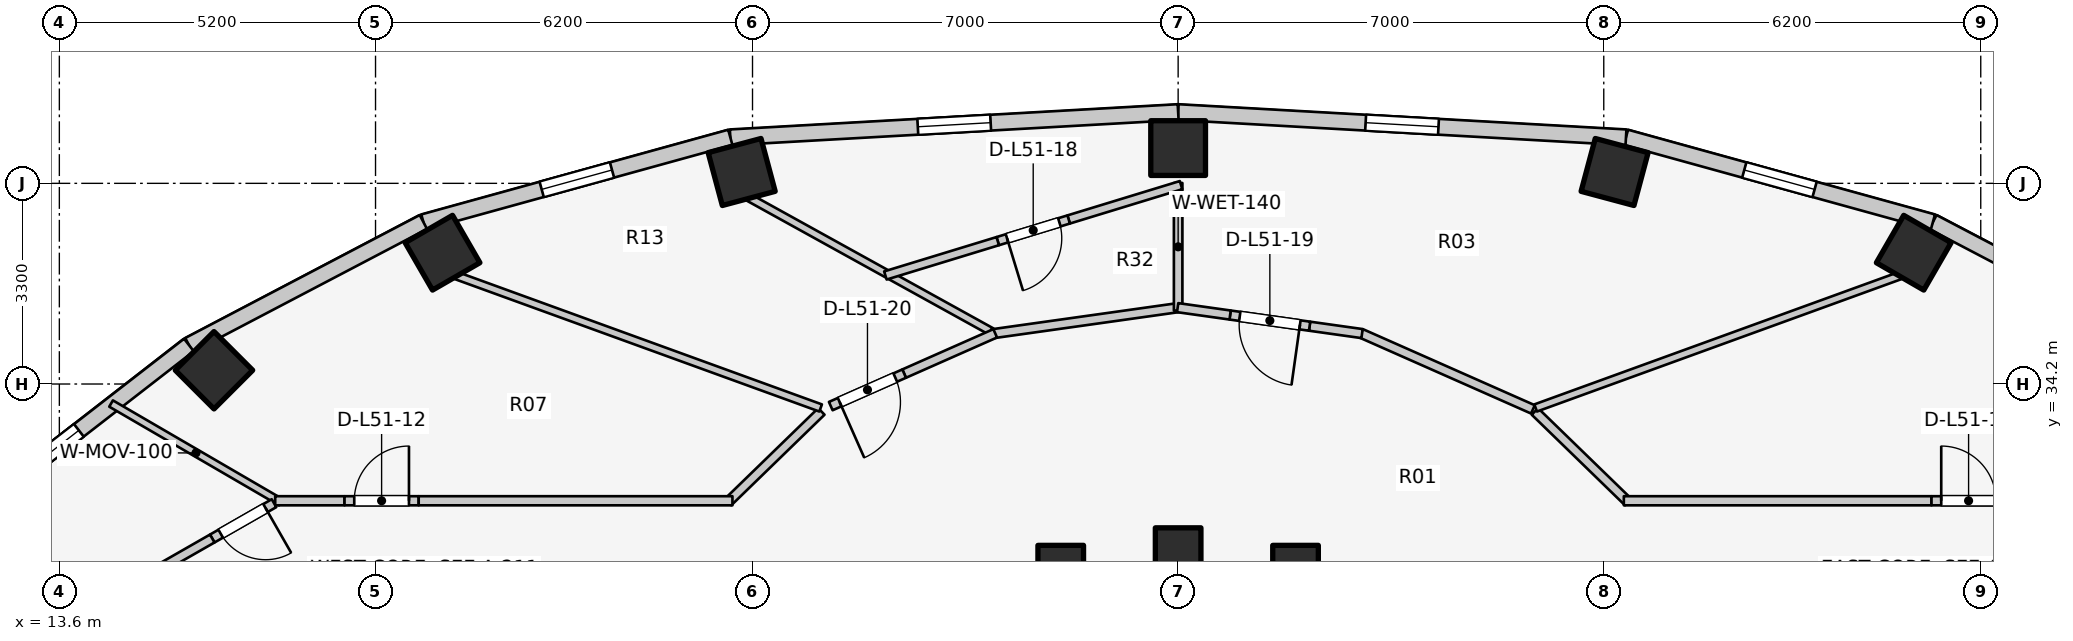
"""IFC4 building model, lengths in metres.
Left out: names, types, materials, properties, quantities, classifications, styles, units other than length and angle.
Written with IfcOpenShell. Run it as: python <this file> out.ifc"""

import sys

from ifc_helpers import new_model, si_unit, direction, frame, frame_2d, origin, origin_2d, place, context, subcontext, project, spatial, rectangle, extrude, element, fill, save


model = new_model("IFC4")
c1 = context("Model", 3, precision=1e-05, world=origin(), true_north=direction((0.0, 1.0)))
c2 = subcontext(c1, "Body", "Model", "MODEL_VIEW")
j1 = project(units=[si_unit("LENGTHUNIT", "METRE"), si_unit("PLANEANGLEUNIT", "RADIAN")], contexts=[c1])
p1 = place(None, origin())
s1 = spatial("IfcSite", under=j1, at=p1, CompositionType="ELEMENT")
p2 = place(p1, origin())
s2 = spatial("IfcBuilding", under=s1, at=p2, CompositionType="ELEMENT")
p3 = place(p2, frame((0.0, 0.0, 168.4)))
s3 = spatial("IfcBuildingStorey", under=s2, at=p3, CompositionType="ELEMENT", Elevation=168.4)
p4 = place(p3, frame((44.098, 36.359, 0.0), z_axis=(0.0, 0.0, 1.0), x_axis=(0.5, 0.866025403784, 0.0)))
e1 = element("IfcColumn", 1, at=p4, inside=s3, PredefinedType="COLUMN", context=c2, shape_type="SweptSolid", body=[
    extrude(rectangle(XDim=0.9, YDim=0.9, at=origin_2d()), origin(), (0.0, 0.0, 1.0), 3.1),
])
p5 = place(p3, frame((33.931, 31.172, 0.0), z_axis=(0.0, 0.0, 1.0), x_axis=(1.0, 0.0, 0.0)))
e2 = element("IfcColumn", 2, at=p5, inside=s3, PredefinedType="COLUMN", context=c2, shape_type="SweptSolid", body=[
    extrude(rectangle(XDim=0.75, YDim=0.75, at=origin_2d()), origin(), (0.0, 0.0, 1.0), 3.1),
])
p6 = place(p3, frame((39.178, 37.687, 0.0), z_axis=(0.0, 0.0, 1.0), x_axis=(0.258819045103, 0.965925826289, 0.0)))
e3 = element("IfcColumn", 3, at=p6, inside=s3, PredefinedType="COLUMN", context=c2, shape_type="SweptSolid", body=[
    extrude(rectangle(XDim=0.9, YDim=0.9, at=origin_2d()), origin(), (0.0, 0.0, 1.0), 3.1),
])
p7 = place(p3, frame((32.0, 31.46, 0.0), z_axis=(0.0, 0.0, 1.0), x_axis=(1.0, 0.0, 0.0)))
e4 = element("IfcColumn", 4, at=p7, inside=s3, PredefinedType="COLUMN", context=c2, shape_type="SweptSolid", body=[
    extrude(rectangle(XDim=0.75, YDim=0.75, at=origin_2d()), origin(), (0.0, 0.0, 1.0), 3.1),
])
p8 = place(p3, frame((32.0, 38.08, 0.0), z_axis=(0.0, 0.0, 1.0), x_axis=(0.0, 1.0, 0.0)))
e5 = element("IfcColumn", 5, at=p8, inside=s3, PredefinedType="COLUMN", context=c2, shape_type="SweptSolid", body=[
    extrude(rectangle(XDim=0.9, YDim=0.9, at=origin_2d()), origin(), (0.0, 0.0, 1.0), 3.1),
])
p9 = place(p3, frame((30.069, 31.172, 0.0), z_axis=(0.0, 0.0, 1.0), x_axis=(1.0, 0.0, 0.0)))
e6 = element("IfcColumn", 6, at=p9, inside=s3, PredefinedType="COLUMN", context=c2, shape_type="SweptSolid", body=[
    extrude(rectangle(XDim=0.75, YDim=0.75, at=origin_2d()), origin(), (0.0, 0.0, 1.0), 3.1),
])
for number, where, z_axis, x_axis in (
    (7, (24.822, 37.687, 0.0), (0.0, 0.0, 1.0), (-0.259, 0.966, 0.0)),
    (8, (19.902, 36.359, 0.0), (0.0, 0.0, 1.0), (-0.5, 0.866, 0.0)),
    (9, (16.143, 34.427, 0.0), (0.0, 0.0, 1.0), (-0.707, 0.707, 0.0)),
):
    element("IfcColumn", number, at=place(p3, frame(where, z_axis=z_axis, x_axis=x_axis)), inside=s3, PredefinedType="COLUMN", context=c2, shape_type="SweptSolid", body=[
        extrude(rectangle(XDim=0.9, YDim=0.9, at=origin_2d()), origin(), (0.0, 0.0, 1.0), 3.1),
    ])
p10 = place(p3, frame((48.269, 34.842, 0.0), z_axis=(0.0, 0.0, 1.0), x_axis=(-0.885660265226, 0.464333818065, 0.0)))
e10 = element("IfcWall", 10, at=p10, inside=s3, PredefinedType="STANDARD", context=c2, shape_type="SweptSolid", body=[
    extrude(rectangle(XDim=4.354, YDim=0.26, at=frame_2d((2.177, 0.0))), origin(), (0.0, 0.0, 1.0), 1.22),
])
p11 = place(p3, frame((44.413, 36.863, 0.0), z_axis=(0.0, 0.0, 1.0), x_axis=(-0.963953455704, 0.26607092144, 0.0)))
e11 = element("IfcWall", 11, at=p11, inside=s3, PredefinedType="STANDARD", context=c2, shape_type="SweptSolid", body=[
    extrude(rectangle(XDim=5.237, YDim=0.26, at=frame_2d((2.618, 0.0))), origin(), (0.0, 0.0, 1.0), 1.22),
])
p12 = place(p11, frame((2.018, 0.0, 0.15)))
e12 = element("IfcOpeningElement", 12, at=p12, cuts=e11, PredefinedType="OPENING", context=c2, shape_type="SweptSolid", body=[
    extrude(rectangle(XDim=1.2, YDim=0.9, at=frame_2d((0.6, 0.45))), frame((0.0, 0.14, 0.0), z_axis=(0.0, -1.0, 0.0), x_axis=(1.0, 0.0, 0.0)), (0.0, 0.0, 1.0), 0.28),
])
p13 = place(p3, frame((39.365, 38.257, 0.0), z_axis=(0.0, 0.0, 1.0), x_axis=(-0.998417906562, 0.056228852534, 0.0)))
e13 = element("IfcWall", 13, at=p13, inside=s3, PredefinedType="STANDARD", context=c2, shape_type="SweptSolid", body=[
    extrude(rectangle(XDim=7.377, YDim=0.26, at=frame_2d((3.688, 0.0))), origin(), (0.0, 0.0, 1.0), 1.22),
])
p14 = place(p13, frame((3.088, 0.0, 0.15)))
e14 = element("IfcOpeningElement", 14, at=p14, cuts=e13, PredefinedType="OPENING", context=c2, shape_type="SweptSolid", body=[
    extrude(rectangle(XDim=1.2, YDim=0.9, at=frame_2d((0.6, 0.45))), frame((0.0, 0.14, 0.0), z_axis=(0.0, -1.0, 0.0), x_axis=(1.0, 0.0, 0.0)), (0.0, 0.0, 1.0), 0.28),
])
p15 = place(p3, frame((32.0, 38.671, 0.0), z_axis=(0.0, 0.0, 1.0), x_axis=(-0.998417906562, -0.056228852534, 0.0)))
e15 = element("IfcWall", 15, at=p15, inside=s3, PredefinedType="STANDARD", context=c2, shape_type="SweptSolid", body=[
    extrude(rectangle(XDim=7.377, YDim=0.26, at=frame_2d((3.688, 0.0))), origin(), (0.0, 0.0, 1.0), 1.22),
])
p16 = place(p15, frame((3.088, 0.0, 0.15)))
e16 = element("IfcOpeningElement", 16, at=p16, cuts=e15, PredefinedType="OPENING", context=c2, shape_type="SweptSolid", body=[
    extrude(rectangle(XDim=1.2, YDim=0.9, at=frame_2d((0.6, 0.45))), frame((0.0, 0.14, 0.0), z_axis=(0.0, -1.0, 0.0), x_axis=(1.0, 0.0, 0.0)), (0.0, 0.0, 1.0), 0.28),
])
p17 = place(p3, frame((24.635, 38.257, 0.0), z_axis=(0.0, 0.0, 1.0), x_axis=(-0.963953455704, -0.26607092144, 0.0)))
e17 = element("IfcWall", 17, at=p17, inside=s3, PredefinedType="STANDARD", context=c2, shape_type="SweptSolid", body=[
    extrude(rectangle(XDim=5.237, YDim=0.26, at=frame_2d((2.618, 0.0))), origin(), (0.0, 0.0, 1.0), 1.22),
])
p18 = place(p17, frame((2.018, 0.0, 0.15)))
e18 = element("IfcOpeningElement", 18, at=p18, cuts=e17, PredefinedType="OPENING", context=c2, shape_type="SweptSolid", body=[
    extrude(rectangle(XDim=1.2, YDim=0.9, at=frame_2d((0.6, 0.45))), frame((0.0, 0.14, 0.0), z_axis=(0.0, -1.0, 0.0), x_axis=(1.0, 0.0, 0.0)), (0.0, 0.0, 1.0), 0.28),
])
p19 = place(p3, frame((19.587, 36.863, 0.0), z_axis=(0.0, 0.0, 1.0), x_axis=(-0.885660265226, -0.464333818065, 0.0)))
e19 = element("IfcWall", 19, at=p19, inside=s3, PredefinedType="STANDARD", context=c2, shape_type="SweptSolid", body=[
    extrude(rectangle(XDim=4.354, YDim=0.26, at=frame_2d((2.177, 0.0))), origin(), (0.0, 0.0, 1.0), 1.22),
])
p20 = place(p3, frame((15.731, 34.842, 0.0), z_axis=(0.0, 0.0, 1.0), x_axis=(-0.790185650662, -0.612867552973, 0.0)))
e20 = element("IfcWall", 20, at=p20, inside=s3, PredefinedType="STANDARD", context=c2, shape_type="SweptSolid", body=[
    extrude(rectangle(XDim=4.239, YDim=0.26, at=frame_2d((2.12, 0.0))), origin(), (0.0, 0.0, 1.0), 1.22),
])
p21 = place(p20, frame((2.29, 0.0, 0.15)))
e21 = element("IfcOpeningElement", 21, at=p21, cuts=e20, PredefinedType="OPENING", context=c2, shape_type="SweptSolid", body=[
    extrude(rectangle(XDim=1.2, YDim=0.9, at=frame_2d((0.6, 0.45))), frame((0.0, 0.14, 0.0), z_axis=(0.0, -1.0, 0.0), x_axis=(1.0, 0.0, 0.0)), (0.0, 0.0, 1.0), 0.28),
])
p22 = place(p3, frame((37.867, 33.749, 0.0), z_axis=(0.0, 0.0, 1.0), x_axis=(0.717419568599, -0.696641344302, 0.0)))
e22 = element("IfcWall", 22, at=p22, inside=s3, PredefinedType="PARTITIONING", context=c2, shape_type="SweptSolid", body=[
    extrude(rectangle(XDim=2.138, YDim=0.15, at=frame_2d((1.069, 0.0))), origin(), (0.0, 0.0, 1.0), 2.019),
])
p23 = place(p3, frame((39.33, 32.28, 0.0), z_axis=(0.0, 0.0, 1.0), x_axis=(1.0, 0.0, 0.0)))
e23 = element("IfcWall", 23, at=p23, inside=s3, PredefinedType="PARTITIONING", context=c2, shape_type="SweptSolid", body=[
    extrude(rectangle(XDim=5.06, YDim=0.15, at=frame_2d((2.53, 0.0))), origin(), (0.0, 0.0, 1.0), 2.019),
])
p24 = place(p3, frame((44.39, 32.28, 0.0), z_axis=(0.0, 0.0, 1.0), x_axis=(1.0, 0.0, 0.0)))
e24 = element("IfcWall", 24, at=p24, inside=s3, PredefinedType="PARTITIONING", context=c2, shape_type="SweptSolid", body=[
    extrude(rectangle(XDim=1.22, YDim=0.15, at=frame_2d((0.61, 0.0))), origin(), (0.0, 0.0, 1.0), 2.16),
])
p25 = place(p24, frame((0.16, 0.0, 0.0)))
e25 = element("IfcOpeningElement", 25, at=p25, cuts=e24, PredefinedType="OPENING", context=c2, shape_type="SweptSolid", body=[
    extrude(rectangle(XDim=0.9, YDim=2.1, at=frame_2d((0.45, 1.05))), frame((0.0, 0.085, 0.0), z_axis=(0.0, -1.0, 0.0), x_axis=(1.0, 0.0, 0.0)), (0.0, 0.0, 1.0), 0.17),
])
p26 = place(p3, frame((17.243, 32.255, 0.0), z_axis=(0.0, 0.0, 1.0), x_axis=(-0.864408655832, 0.502789892224, 0.0)))
e26 = element("IfcWall", 26, at=p26, inside=s3, PredefinedType="MOVABLE", context=c2, shape_type="SweptSolid", body=[
    extrude(rectangle(XDim=3.23, YDim=0.12, at=frame_2d((1.615, 0.0))), origin(), (0.0, 0.0, 1.0), 1.22),
])
p27 = place(p3, frame((26.133, 33.749, 0.0), z_axis=(0.0, 0.0, 1.0), x_axis=(-0.717419568599, -0.696641344302, 0.0)))
e27 = element("IfcWall", 27, at=p27, inside=s3, PredefinedType="PARTITIONING", context=c2, shape_type="SweptSolid", body=[
    extrude(rectangle(XDim=2.138, YDim=0.15, at=frame_2d((1.069, 0.0))), origin(), (0.0, 0.0, 1.0), 2.019),
])
p28 = place(p3, frame((17.15, 32.28, 0.0), z_axis=(0.0, 0.0, 1.0), x_axis=(1.0, 0.0, 0.0)))
e28 = element("IfcWall", 28, at=p28, inside=s3, PredefinedType="PARTITIONING", context=c2, shape_type="SweptSolid", body=[
    extrude(rectangle(XDim=1.14, YDim=0.15, at=frame_2d((0.57, 0.0))), origin(), (0.0, 0.0, 1.0), 2.575),
])
p29 = place(p3, frame((18.29, 32.28, 0.0), z_axis=(0.0, 0.0, 1.0), x_axis=(1.0, 0.0, 0.0)))
e29 = element("IfcWall", 29, at=p29, inside=s3, PredefinedType="PARTITIONING", context=c2, shape_type="SweptSolid", body=[
    extrude(rectangle(XDim=1.22, YDim=0.15, at=frame_2d((0.61, 0.0))), origin(), (0.0, 0.0, 1.0), 2.575),
])
p30 = place(p29, frame((0.16, 0.0, 0.0)))
e30 = element("IfcOpeningElement", 30, at=p30, cuts=e29, PredefinedType="OPENING", context=c2, shape_type="SweptSolid", body=[
    extrude(rectangle(XDim=0.9, YDim=2.1, at=frame_2d((0.45, 1.05))), frame((0.0, 0.085, 0.0), z_axis=(0.0, -1.0, 0.0), x_axis=(1.0, 0.0, 0.0)), (0.0, 0.0, 1.0), 0.17),
])
p31 = place(p3, frame((19.51, 32.28, 0.0), z_axis=(0.0, 0.0, 1.0), x_axis=(1.0, 0.0, 0.0)))
e31 = element("IfcWall", 31, at=p31, inside=s3, PredefinedType="PARTITIONING", context=c2, shape_type="SweptSolid", body=[
    extrude(rectangle(XDim=5.16, YDim=0.15, at=frame_2d((2.58, 0.0))), origin(), (0.0, 0.0, 1.0), 2.019),
])
p32 = place(p3, frame((17.13, 32.24, 0.0), z_axis=(0.0, 0.0, 1.0), x_axis=(-0.867934757977, -0.496678221684, 0.0)))
e32 = element("IfcWall", 32, at=p32, inside=s3, PredefinedType="PARTITIONING", context=c2, shape_type="SweptSolid", body=[
    extrude(rectangle(XDim=1.17, YDim=0.15, at=frame_2d((0.585, 0.0))), origin(), (0.0, 0.0, 1.0), 2.11),
])
p33 = place(p32, frame((0.16, 0.0, 0.0)))
e33 = element("IfcOpeningElement", 33, at=p33, cuts=e32, PredefinedType="OPENING", context=c2, shape_type="SweptSolid", body=[
    extrude(rectangle(XDim=0.85, YDim=2.05, at=frame_2d((0.425, 1.025))), frame((0.0, 0.085, 0.0), z_axis=(0.0, -1.0, 0.0), x_axis=(1.0, 0.0, 0.0)), (0.0, 0.0, 1.0), 0.17),
])
p34 = place(p3, frame((16.115, 31.659, 0.0), z_axis=(0.0, 0.0, 1.0), x_axis=(-0.868005797727, -0.496554060614, 0.0)))
e34 = element("IfcWall", 34, at=p34, inside=s3, PredefinedType="PARTITIONING", context=c2, shape_type="SweptSolid", body=[
    extrude(rectangle(XDim=1.267, YDim=0.15, at=frame_2d((0.633, 0.0))), origin(), (0.0, 0.0, 1.0), 1.22),
])
p35 = place(p3, frame((37.88, 33.806, 0.0), z_axis=(0.0, 0.0, 1.0), x_axis=(0.939901628116, 0.341445353557, 0.0)))
e35 = element("IfcWall", 35, at=p35, inside=s3, PredefinedType="PARTITIONING", context=c2, shape_type="SweptSolid", body=[
    extrude(rectangle(XDim=6.387, YDim=0.125, at=frame_2d((3.194, 0.0))), origin(), (0.0, 0.0, 1.0), 1.22),
])
p36 = place(p3, frame((28.935, 35.058, 0.0), z_axis=(0.0, 0.0, 1.0), x_axis=(-0.875077338582, 0.48398311076, 0.0)))
e36 = element("IfcWall", 36, at=p36, inside=s3, PredefinedType="PARTITIONING", context=c2, shape_type="SweptSolid", body=[
    extrude(rectangle(XDim=4.573, YDim=0.125, at=frame_2d((2.287, 0.0))), origin(), (0.0, 0.0, 1.0), 1.22),
])
p37 = place(p3, frame((26.12, 33.806, 0.0), z_axis=(0.0, 0.0, 1.0), x_axis=(-0.939901628116, 0.341445353557, 0.0)))
e37 = element("IfcWall", 37, at=p37, inside=s3, PredefinedType="PARTITIONING", context=c2, shape_type="SweptSolid", body=[
    extrude(rectangle(XDim=6.387, YDim=0.125, at=frame_2d((3.194, 0.0))), origin(), (0.0, 0.0, 1.0), 1.22),
])
p38 = place(p3, frame((32.05, 35.463, 0.0), z_axis=(0.0, 0.0, 1.0), x_axis=(-0.990254405439, -0.139270285808, 0.0)))
e38 = element("IfcWall", 38, at=p38, inside=s3, PredefinedType="PARTITIONING", context=c2, shape_type="SweptSolid", body=[
    extrude(rectangle(XDim=3.147, YDim=0.15, at=frame_2d((1.573, 0.0))), origin(), (0.0, 0.0, 1.0), 2.019),
])
p39 = place(p3, frame((32.0, 35.406, 0.0), z_axis=(0.0, 0.0, 1.0), x_axis=(0.0, 1.0, 0.0)))
e39 = element("IfcWall", 39, at=p39, inside=s3, PredefinedType="PLUMBINGWALL", context=c2, shape_type="SweptSolid", body=[
    extrude(rectangle(XDim=2.1, YDim=0.14, at=frame_2d((1.05, 0.0))), origin(), (0.0, 0.0, 1.0), 2.019),
])
p40 = place(p3, frame((32.048, 37.471, 0.0), z_axis=(0.0, 0.0, 1.0), x_axis=(-0.956353532472, -0.292212116328, 0.0)))
e40 = element("IfcWall", 40, at=p40, inside=s3, PredefinedType="PLUMBINGWALL", context=c2, shape_type="SweptSolid", body=[
    extrude(rectangle(XDim=1.932, YDim=0.14, at=frame_2d((0.966, 0.0))), origin(), (0.0, 0.0, 1.0), 2.019),
])
p41 = place(p3, frame((30.2, 36.906, 0.0), z_axis=(0.0, 0.0, 1.0), x_axis=(-0.956348463413, -0.292228705857, 0.0)))
e41 = element("IfcWall", 41, at=p41, inside=s3, PredefinedType="PLUMBINGWALL", context=c2, shape_type="SweptSolid", body=[
    extrude(rectangle(XDim=1.22, YDim=0.14, at=frame_2d((0.61, 0.0))), origin(), (0.0, 0.0, 1.0), 2.575),
])
p42 = place(p41, frame((0.16, 0.0, 0.0)))
e42 = element("IfcOpeningElement", 42, at=p42, cuts=e41, PredefinedType="OPENING", context=c2, shape_type="SweptSolid", body=[
    extrude(rectangle(XDim=0.9, YDim=2.1, at=frame_2d((0.45, 1.05))), frame((0.0, 0.08, 0.0), z_axis=(0.0, -1.0, 0.0), x_axis=(1.0, 0.0, 0.0)), (0.0, 0.0, 1.0), 0.16),
])
p43 = place(p3, frame((29.033, 36.55, 0.0), z_axis=(0.0, 0.0, 1.0), x_axis=(-0.956342743061, -0.292247425644, 0.0)))
e43 = element("IfcWall", 43, at=p43, inside=s3, PredefinedType="PLUMBINGWALL", context=c2, shape_type="SweptSolid", body=[
    extrude(rectangle(XDim=1.932, YDim=0.14, at=frame_2d((0.966, 0.0))), origin(), (0.0, 0.0, 1.0), 2.575),
])
p44 = place(p3, frame((37.835, 33.783, 0.0), z_axis=(0.0, 0.0, 1.0), x_axis=(-0.91445214467, 0.404694051239, 0.0)))
e44 = element("IfcWall", 44, at=p44, inside=s3, PredefinedType="PARTITIONING", context=c2, shape_type="SweptSolid", body=[
    extrude(rectangle(XDim=3.091, YDim=0.15, at=frame_2d((1.545, 0.0))), origin(), (0.0, 0.0, 1.0), 2.019),
])
p45 = place(p3, frame((35.025, 35.029, 0.0), z_axis=(0.0, 0.0, 1.0), x_axis=(-0.990255371296, 0.139263418091, 0.0)))
e45 = element("IfcWall", 45, at=p45, inside=s3, PredefinedType="PARTITIONING", context=c2, shape_type="SweptSolid", body=[
    extrude(rectangle(XDim=0.871, YDim=0.15, at=frame_2d((0.436, 0.0))), origin(), (0.0, 0.0, 1.0), 2.575),
])
p46 = place(p3, frame((34.162, 35.151, 0.0), z_axis=(0.0, 0.0, 1.0), x_axis=(-0.990228663531, 0.139453196171, 0.0)))
e46 = element("IfcWall", 46, at=p46, inside=s3, PredefinedType="PARTITIONING", context=c2, shape_type="SweptSolid", body=[
    extrude(rectangle(XDim=1.32, YDim=0.15, at=frame_2d((0.66, 0.0))), origin(), (0.0, 0.0, 1.0), 2.575),
])
p47 = place(p46, frame((0.16, 0.0, 0.0)))
e47 = element("IfcOpeningElement", 47, at=p47, cuts=e46, PredefinedType="OPENING", context=c2, shape_type="SweptSolid", body=[
    extrude(rectangle(XDim=1.0, YDim=2.1, at=frame_2d((0.5, 1.05))), frame((0.0, 0.085, 0.0), z_axis=(0.0, -1.0, 0.0), x_axis=(1.0, 0.0, 0.0)), (0.0, 0.0, 1.0), 0.17),
])
p48 = place(p3, frame((32.855, 35.335, 0.0), z_axis=(0.0, 0.0, 1.0), x_axis=(-0.990255371296, 0.139263418091, 0.0)))
e48 = element("IfcWall", 48, at=p48, inside=s3, PredefinedType="PARTITIONING", context=c2, shape_type="SweptSolid", body=[
    extrude(rectangle(XDim=0.871, YDim=0.15, at=frame_2d((0.436, 0.0))), origin(), (0.0, 0.0, 1.0), 2.019),
])
p49 = place(p3, frame((28.991, 35.034, 0.0), z_axis=(0.0, 0.0, 1.0), x_axis=(-0.914437708412, -0.404726670031, 0.0)))
e49 = element("IfcWall", 49, at=p49, inside=s3, PredefinedType="PARTITIONING", context=c2, shape_type="SweptSolid", body=[
    extrude(rectangle(XDim=1.637, YDim=0.15, at=frame_2d((0.819, 0.0))), origin(), (0.0, 0.0, 1.0), 2.019),
])
p50 = place(p3, frame((27.494, 34.371, 0.0), z_axis=(0.0, 0.0, 1.0), x_axis=(-0.914451103971, -0.404696402809, 0.0)))
e50 = element("IfcWall", 50, at=p50, inside=s3, PredefinedType="PARTITIONING", context=c2, shape_type="SweptSolid", body=[
    extrude(rectangle(XDim=1.32, YDim=0.15, at=frame_2d((0.66, 0.0))), origin(), (0.0, 0.0, 1.0), 2.16),
])
p51 = place(p50, frame((0.16, 0.0, 0.0)))
e51 = element("IfcOpeningElement", 51, at=p51, cuts=e50, PredefinedType="OPENING", context=c2, shape_type="SweptSolid", body=[
    extrude(rectangle(XDim=1.0, YDim=2.1, at=frame_2d((0.5, 1.05))), frame((0.0, 0.085, 0.0), z_axis=(0.0, -1.0, 0.0), x_axis=(1.0, 0.0, 0.0)), (0.0, 0.0, 1.0), 0.17),
])
p52 = place(p12, origin())
e52 = element("IfcWindow", 52, at=p52, inside=s3, PartitioningType="SINGLE_PANEL", PredefinedType="WINDOW", context=c2, shape_type="SweptSolid", body=[
    extrude(rectangle(XDim=1.2, YDim=0.9, at=frame_2d((0.6, 0.45))), frame((0.0, 0.03, 0.0), z_axis=(0.0, -1.0, 0.0), x_axis=(1.0, 0.0, 0.0)), (0.0, 0.0, 1.0), 0.06),
])
fill(e12, e52)
p53 = place(p14, origin())
e53 = element("IfcWindow", 53, at=p53, inside=s3, PartitioningType="SINGLE_PANEL", PredefinedType="WINDOW", context=c2, shape_type="SweptSolid", body=[
    extrude(rectangle(XDim=1.2, YDim=0.9, at=frame_2d((0.6, 0.45))), frame((0.0, 0.03, 0.0), z_axis=(0.0, -1.0, 0.0), x_axis=(1.0, 0.0, 0.0)), (0.0, 0.0, 1.0), 0.06),
])
fill(e14, e53)
p54 = place(p16, origin())
e54 = element("IfcWindow", 54, at=p54, inside=s3, PartitioningType="SINGLE_PANEL", PredefinedType="WINDOW", context=c2, shape_type="SweptSolid", body=[
    extrude(rectangle(XDim=1.2, YDim=0.9, at=frame_2d((0.6, 0.45))), frame((0.0, 0.03, 0.0), z_axis=(0.0, -1.0, 0.0), x_axis=(1.0, 0.0, 0.0)), (0.0, 0.0, 1.0), 0.06),
])
fill(e16, e54)
p55 = place(p18, origin())
e55 = element("IfcWindow", 55, at=p55, inside=s3, PartitioningType="SINGLE_PANEL", PredefinedType="WINDOW", context=c2, shape_type="SweptSolid", body=[
    extrude(rectangle(XDim=1.2, YDim=0.9, at=frame_2d((0.6, 0.45))), frame((0.0, 0.03, 0.0), z_axis=(0.0, -1.0, 0.0), x_axis=(1.0, 0.0, 0.0)), (0.0, 0.0, 1.0), 0.06),
])
fill(e18, e55)
p56 = place(p21, origin())
e56 = element("IfcWindow", 56, at=p56, inside=s3, PartitioningType="SINGLE_PANEL", PredefinedType="WINDOW", context=c2, shape_type="SweptSolid", body=[
    extrude(rectangle(XDim=1.2, YDim=0.9, at=frame_2d((0.6, 0.45))), frame((0.0, 0.03, 0.0), z_axis=(0.0, -1.0, 0.0), x_axis=(1.0, 0.0, 0.0)), (0.0, 0.0, 1.0), 0.06),
])
fill(e21, e56)
p57 = place(p25, origin())
e57 = element("IfcDoor", 57, at=p57, inside=s3, OperationType="SINGLE_SWING_LEFT", PredefinedType="DOOR", context=c2, shape_type="SweptSolid", body=[
    extrude(rectangle(XDim=0.9, YDim=2.1, at=frame_2d((0.45, 1.05))), frame((0.0, 0.025, 0.0), z_axis=(0.0, -1.0, 0.0), x_axis=(1.0, 0.0, 0.0)), (0.0, 0.0, 1.0), 0.05),
])
fill(e25, e57)
p58 = place(p30, origin())
e58 = element("IfcDoor", 58, at=p58, inside=s3, OperationType="SINGLE_SWING_RIGHT", PredefinedType="DOOR", context=c2, shape_type="SweptSolid", body=[
    extrude(rectangle(XDim=0.9, YDim=2.1, at=frame_2d((0.45, 1.05))), frame((0.0, 0.025, 0.0), z_axis=(0.0, -1.0, 0.0), x_axis=(1.0, 0.0, 0.0)), (0.0, 0.0, 1.0), 0.05),
])
fill(e30, e58)
p59 = place(p33, origin())
e59 = element("IfcDoor", 59, at=p59, inside=s3, OperationType="SINGLE_SWING_LEFT", PredefinedType="DOOR", context=c2, shape_type="SweptSolid", body=[
    extrude(rectangle(XDim=0.85, YDim=2.05, at=frame_2d((0.425, 1.025))), frame((0.0, 0.025, 0.0), z_axis=(0.0, -1.0, 0.0), x_axis=(1.0, 0.0, 0.0)), (0.0, 0.0, 1.0), 0.05),
])
fill(e33, e59)
p60 = place(p42, origin())
e60 = element("IfcDoor", 60, at=p60, inside=s3, OperationType="SINGLE_SWING_RIGHT", PredefinedType="DOOR", context=c2, shape_type="SweptSolid", body=[
    extrude(rectangle(XDim=0.9, YDim=2.1, at=frame_2d((0.45, 1.05))), frame((0.0, 0.025, 0.0), z_axis=(0.0, -1.0, 0.0), x_axis=(1.0, 0.0, 0.0)), (0.0, 0.0, 1.0), 0.05),
])
fill(e42, e60)
p61 = place(p47, origin())
e61 = element("IfcDoor", 61, at=p61, inside=s3, OperationType="SINGLE_SWING_LEFT", PredefinedType="DOOR", context=c2, shape_type="SweptSolid", body=[
    extrude(rectangle(XDim=1.0, YDim=2.1, at=frame_2d((0.5, 1.05))), frame((0.0, 0.025, 0.0), z_axis=(0.0, -1.0, 0.0), x_axis=(1.0, 0.0, 0.0)), (0.0, 0.0, 1.0), 0.05),
])
fill(e47, e61)
p62 = place(p51, origin())
e62 = element("IfcDoor", 62, at=p62, inside=s3, OperationType="SINGLE_SWING_RIGHT", PredefinedType="DOOR", context=c2, shape_type="SweptSolid", body=[
    extrude(rectangle(XDim=1.0, YDim=2.1, at=frame_2d((0.5, 1.05))), frame((0.0, 0.025, 0.0), z_axis=(0.0, -1.0, 0.0), x_axis=(1.0, 0.0, 0.0)), (0.0, 0.0, 1.0), 0.05),
])
fill(e51, e62)
save(model, sys.argv[1])
